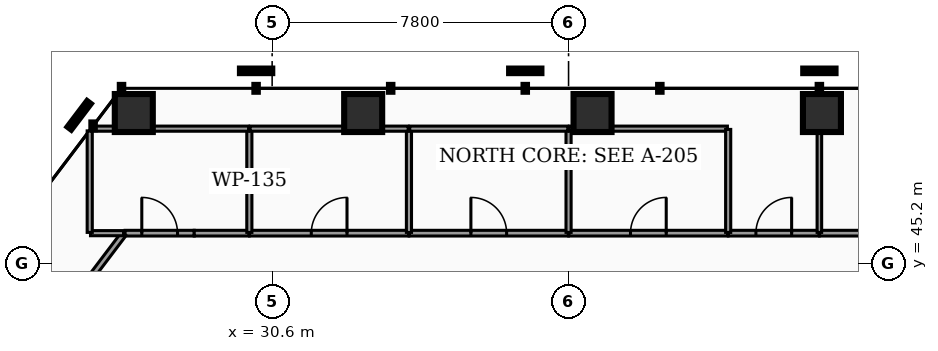
"""IFC4 building model, lengths in metres.
Left out: names, types, materials, properties, quantities, classifications, styles, units other than length and angle.
Written with IfcOpenShell. Run it as: python <this file> out.ifc"""

import sys

from ifc_helpers import new_model, si_unit, direction, frame, frame_2d, origin, origin_2d, place, context, subcontext, project, spatial, rectangle, hollow_rectangle, extrude, element, fill, save


model = new_model("IFC4")
c1 = context("Model", 3, precision=1e-05, world=origin(), true_north=direction((0.0, 1.0)))
c2 = subcontext(c1, "Body", "Model", "MODEL_VIEW")
j1 = project(units=[si_unit("LENGTHUNIT", "METRE"), si_unit("PLANEANGLEUNIT", "RADIAN")], contexts=[c1])
p1 = place(None, origin())
s1 = spatial("IfcSite", under=j1, at=p1, CompositionType="ELEMENT")
p2 = place(p1, origin())
s2 = spatial("IfcBuilding", under=s1, at=p2, CompositionType="ELEMENT")
p3 = place(p2, frame((0.0, 0.0, 68.34)))
s3 = spatial("IfcBuildingStorey", under=s2, at=p3, CompositionType="ELEMENT", Elevation=68.34)
p4 = place(p3, frame((45.067, 49.161, 0.0), z_axis=(0.043921338249, -0.020364690264, 0.998827410235), x_axis=(0.42064633694, 0.907224701614, 0.0)))
e1 = element("IfcColumn", 1, at=p4, inside=s3, PredefinedType="COLUMN", context=c2, shape_type="SweptSolid", body=[
    extrude(hollow_rectangle(XDim=1.0, YDim=1.0, WallThickness=0.05, at=origin_2d()), origin(), (0.0, 0.0, 1.0), 3.824),
])
p5 = place(p3, frame((39.031, 49.161, 0.0), z_axis=(-0.003706222059, -0.020384221326, 0.999785350682), x_axis=(0.9838699101, -0.1788854382, 0.0)))
e2 = element("IfcColumn", 2, at=p5, inside=s3, PredefinedType="COLUMN", context=c2, shape_type="SweptSolid", body=[
    extrude(hollow_rectangle(XDim=1.0, YDim=1.0, WallThickness=0.05, at=origin_2d()), origin(), (0.0, 0.0, 1.0), 3.821),
])
p6 = place(p3, frame((32.995, 49.161, 0.0), z_axis=(-0.051244939284, -0.02035757862, 0.998478605274), x_axis=(0.36919466432, -0.929352086046, 0.0)))
e3 = element("IfcColumn", 3, at=p6, inside=s3, PredefinedType="COLUMN", context=c2, shape_type="SweptSolid", body=[
    extrude(hollow_rectangle(XDim=1.0, YDim=1.0, WallThickness=0.05, at=origin_2d()), origin(), (0.0, 0.0, 1.0), 3.826),
])
p7 = place(p3, frame((26.96, 49.161, 0.0), z_axis=(-0.098563985299, -0.020285104071, 0.994923944508), x_axis=(0.201581600016, -0.979471724214, 0.0)))
e4 = element("IfcColumn", 4, at=p7, inside=s3, PredefinedType="COLUMN", context=c2, shape_type="SweptSolid", body=[
    extrude(hollow_rectangle(XDim=1.0, YDim=1.0, WallThickness=0.05, at=origin_2d()), origin(), (0.0, 0.0, 1.0), 3.839),
])
p8 = place(p3, frame((26.73, 46.0, 0.0), z_axis=(0.0, 0.0, 1.0), x_axis=(1.0, 0.0, 0.0)))
e5 = element("IfcWall", 5, at=p8, inside=s3, PredefinedType="PARTITIONING", context=c2, shape_type="SweptSolid", body=[
    extrude(rectangle(XDim=1.82, YDim=0.15, at=frame_2d((0.91, 0.0))), origin(), (0.0, 0.0, 1.0), 2.777),
])
p9 = place(p8, frame((0.44, 0.0, 0.0)))
e6 = element("IfcOpeningElement", 6, at=p9, cuts=e5, PredefinedType="OPENING", context=c2, shape_type="SweptSolid", body=[
    extrude(rectangle(XDim=0.94, YDim=2.05, at=frame_2d((0.47, 1.025))), frame((0.0, 0.085, 0.0), z_axis=(0.0, -1.0, 0.0), x_axis=(1.0, 0.0, 0.0)), (0.0, 0.0, 1.0), 0.17),
])
p10 = place(p3, frame((28.55, 46.0, 0.0), z_axis=(0.0, 0.0, 1.0), x_axis=(1.0, 0.0, 0.0)))
e7 = element("IfcWall", 7, at=p10, inside=s3, PredefinedType="PARTITIONING", context=c2, shape_type="SweptSolid", body=[
    extrude(rectangle(XDim=1.445, YDim=0.15, at=frame_2d((0.723, 0.0))), origin(), (0.0, 0.0, 1.0), 2.777),
])
p11 = place(p3, frame((30.005, 46.0, 0.0), z_axis=(0.0, 0.0, 1.0), x_axis=(1.0, 0.0, 0.0)))
e8 = element("IfcWall", 8, at=p11, inside=s3, PredefinedType="PARTITIONING", context=c2, shape_type="SweptSolid", body=[
    extrude(rectangle(XDim=4.19, YDim=0.15, at=frame_2d((2.095, 0.0))), origin(), (0.0, 0.0, 1.0), 2.777),
])
p12 = place(p11, frame((1.625, 0.0, 0.0)))
e9 = element("IfcOpeningElement", 9, at=p12, cuts=e8, PredefinedType="OPENING", context=c2, shape_type="SweptSolid", body=[
    extrude(rectangle(XDim=0.94, YDim=2.05, at=frame_2d((0.47, 1.025))), frame((0.0, 0.085, 0.0), z_axis=(0.0, -1.0, 0.0), x_axis=(1.0, 0.0, 0.0)), (0.0, 0.0, 1.0), 0.17),
])
p13 = place(p3, frame((34.205, 46.0, 0.0), z_axis=(0.0, 0.0, 1.0), x_axis=(1.0, 0.0, 0.0)))
e10 = element("IfcWall", 10, at=p13, inside=s3, PredefinedType="PARTITIONING", context=c2, shape_type="SweptSolid", body=[
    extrude(rectangle(XDim=4.19, YDim=0.15, at=frame_2d((2.095, 0.0))), origin(), (0.0, 0.0, 1.0), 2.777),
])
p14 = place(p13, frame((1.625, 0.0, 0.0)))
e11 = element("IfcOpeningElement", 11, at=p14, cuts=e10, PredefinedType="OPENING", context=c2, shape_type="SweptSolid", body=[
    extrude(rectangle(XDim=0.94, YDim=2.05, at=frame_2d((0.47, 1.025))), frame((0.0, 0.085, 0.0), z_axis=(0.0, -1.0, 0.0), x_axis=(1.0, 0.0, 0.0)), (0.0, 0.0, 1.0), 0.17),
])
p15 = place(p3, frame((38.405, 46.0, 0.0), z_axis=(0.0, 0.0, 1.0), x_axis=(1.0, 0.0, 0.0)))
e12 = element("IfcWall", 12, at=p15, inside=s3, PredefinedType="PARTITIONING", context=c2, shape_type="SweptSolid", body=[
    extrude(rectangle(XDim=4.19, YDim=0.15, at=frame_2d((2.095, 0.0))), origin(), (0.0, 0.0, 1.0), 2.777),
])
p16 = place(p15, frame((1.625, 0.0, 0.0)))
e13 = element("IfcOpeningElement", 13, at=p16, cuts=e12, PredefinedType="OPENING", context=c2, shape_type="SweptSolid", body=[
    extrude(rectangle(XDim=0.94, YDim=2.05, at=frame_2d((0.47, 1.025))), frame((0.0, 0.085, 0.0), z_axis=(0.0, -1.0, 0.0), x_axis=(1.0, 0.0, 0.0)), (0.0, 0.0, 1.0), 0.17),
])
p17 = place(p3, frame((25.45, 44.337, 0.0), z_axis=(0.0, 0.0, 1.0), x_axis=(0.603848590911, 0.797099039803, 0.0)))
e14 = element("IfcWall", 14, at=p17, inside=s3, PredefinedType="PARTITIONING", context=c2, shape_type="SweptSolid", body=[
    extrude(rectangle(XDim=2.067, YDim=0.15, at=frame_2d((1.033, 0.0))), origin(), (0.0, 0.0, 1.0), 2.777),
])
p18 = place(p3, frame((45.005, 46.0, 0.0), z_axis=(0.0, 0.0, 1.0), x_axis=(1.0, 0.0, 0.0)))
e15 = element("IfcWall", 15, at=p18, inside=s3, PredefinedType="PARTITIONING", context=c2, shape_type="SweptSolid", body=[
    extrude(rectangle(XDim=3.345, YDim=0.15, at=frame_2d((1.673, 0.0))), origin(), (0.0, 0.0, 1.0), 2.777),
])
p19 = place(p18, frame((1.202, 0.0, 0.0)))
e16 = element("IfcOpeningElement", 16, at=p19, cuts=e15, PredefinedType="OPENING", context=c2, shape_type="SweptSolid", body=[
    extrude(rectangle(XDim=0.94, YDim=2.05, at=frame_2d((0.47, 1.025))), frame((0.0, 0.085, 0.0), z_axis=(0.0, -1.0, 0.0), x_axis=(1.0, 0.0, 0.0)), (0.0, 0.0, 1.0), 0.17),
])
p20 = place(p3, frame((42.605, 46.0, 0.0), z_axis=(0.0, 0.0, 1.0), x_axis=(1.0, 0.0, 0.0)))
e17 = element("IfcWall", 17, at=p20, inside=s3, PredefinedType="PARTITIONING", context=c2, shape_type="SweptSolid", body=[
    extrude(rectangle(XDim=2.39, YDim=0.15, at=frame_2d((1.195, 0.0))), origin(), (0.0, 0.0, 1.0), 2.777),
])
p21 = place(p20, frame((0.725, 0.0, 0.0)))
e18 = element("IfcOpeningElement", 18, at=p21, cuts=e17, PredefinedType="OPENING", context=c2, shape_type="SweptSolid", body=[
    extrude(rectangle(XDim=0.94, YDim=2.05, at=frame_2d((0.47, 1.025))), frame((0.0, 0.085, 0.0), z_axis=(0.0, -1.0, 0.0), x_axis=(1.0, 0.0, 0.0)), (0.0, 0.0, 1.0), 0.17),
])
p22 = place(p3, frame((30.0, 46.02, 0.0), z_axis=(0.0, 0.0, 1.0), x_axis=(0.0, 1.0, 0.0)))
e19 = element("IfcWall", 19, at=p22, inside=s3, PredefinedType="PARTITIONING", context=c2, shape_type="SweptSolid", body=[
    extrude(rectangle(XDim=2.71, YDim=0.135, at=frame_2d((1.355, 0.0))), origin(), (0.0, 0.0, 1.0), 2.777),
])
p23 = place(p3, frame((25.82, 46.0, 0.0), z_axis=(0.0, 0.0, 1.0), x_axis=(1.0, 0.0, 0.0)))
e20 = element("IfcWall", 20, at=p23, inside=s3, PredefinedType="PARTITIONING", context=c2, shape_type="SweptSolid", body=[
    extrude(rectangle(XDim=0.87, YDim=0.135, at=frame_2d((0.435, 0.0))), origin(), (0.0, 0.0, 1.0), 2.777),
])
p24 = place(p3, frame((25.8, 46.02, 0.0), z_axis=(0.0, 0.0, 1.0), x_axis=(0.0, 1.0, 0.0)))
e21 = element("IfcWall", 21, at=p24, inside=s3, PredefinedType="PARTITIONING", context=c2, shape_type="SweptSolid", body=[
    extrude(rectangle(XDim=2.672, YDim=0.135, at=frame_2d((1.336, 0.0))), origin(), (0.0, 0.0, 1.0), 2.777),
])
p25 = place(p3, frame((25.848, 48.75, 0.0), z_axis=(0.0, 0.0, 1.0), x_axis=(1.0, 0.0, 0.0)))
e22 = element("IfcWall", 22, at=p25, inside=s3, PredefinedType="PARTITIONING", context=c2, shape_type="SweptSolid", body=[
    extrude(rectangle(XDim=4.132, YDim=0.135, at=frame_2d((2.066, 0.0))), origin(), (0.0, 0.0, 1.0), 2.777),
])
p26 = place(p3, frame((34.2, 46.02, 0.0), z_axis=(0.0, 0.0, 1.0), x_axis=(0.0, 1.0, 0.0)))
e23 = element("IfcWall", 23, at=p26, inside=s3, PredefinedType="PARTITIONING", context=c2, shape_type="SweptSolid", body=[
    extrude(rectangle(XDim=2.71, YDim=0.135, at=frame_2d((1.355, 0.0))), origin(), (0.0, 0.0, 1.0), 2.777),
])
p27 = place(p3, frame((30.02, 48.75, 0.0), z_axis=(0.0, 0.0, 1.0), x_axis=(1.0, 0.0, 0.0)))
e24 = element("IfcWall", 24, at=p27, inside=s3, PredefinedType="PARTITIONING", context=c2, shape_type="SweptSolid", body=[
    extrude(rectangle(XDim=4.16, YDim=0.135, at=frame_2d((2.08, 0.0))), origin(), (0.0, 0.0, 1.0), 2.777),
])
p28 = place(p3, frame((38.4, 46.02, 0.0), z_axis=(0.0, 0.0, 1.0), x_axis=(0.0, 1.0, 0.0)))
e25 = element("IfcWall", 25, at=p28, inside=s3, PredefinedType="PARTITIONING", context=c2, shape_type="SweptSolid", body=[
    extrude(rectangle(XDim=2.71, YDim=0.135, at=frame_2d((1.355, 0.0))), origin(), (0.0, 0.0, 1.0), 2.777),
])
p29 = place(p3, frame((34.22, 48.75, 0.0), z_axis=(0.0, 0.0, 1.0), x_axis=(1.0, 0.0, 0.0)))
e26 = element("IfcWall", 26, at=p29, inside=s3, PredefinedType="PARTITIONING", context=c2, shape_type="SweptSolid", body=[
    extrude(rectangle(XDim=4.16, YDim=0.135, at=frame_2d((2.08, 0.0))), origin(), (0.0, 0.0, 1.0), 2.777),
])
p30 = place(p3, frame((38.42, 48.75, 0.0), z_axis=(0.0, 0.0, 1.0), x_axis=(1.0, 0.0, 0.0)))
e27 = element("IfcWall", 27, at=p30, inside=s3, PredefinedType="PARTITIONING", context=c2, shape_type="SweptSolid", body=[
    extrude(rectangle(XDim=4.16, YDim=0.135, at=frame_2d((2.08, 0.0))), origin(), (0.0, 0.0, 1.0), 2.777),
])
p31 = place(p3, frame((42.6, 46.02, 0.0), z_axis=(0.0, 0.0, 1.0), x_axis=(0.0, 1.0, 0.0)))
e28 = element("IfcWall", 28, at=p31, inside=s3, PredefinedType="PARTITIONING", context=c2, shape_type="SweptSolid", body=[
    extrude(rectangle(XDim=2.71, YDim=0.135, at=frame_2d((1.355, 0.0))), origin(), (0.0, 0.0, 1.0), 2.777),
])
p32 = place(p3, frame((45.0, 46.02, 0.0), z_axis=(0.0, 0.0, 1.0), x_axis=(0.0, 1.0, 0.0)))
e29 = element("IfcWall", 29, at=p32, inside=s3, PredefinedType="PARTITIONING", context=c2, shape_type="SweptSolid", body=[
    extrude(rectangle(XDim=3.776, YDim=0.12, at=frame_2d((1.888, 0.0))), origin(), (0.0, 0.0, 1.0), 2.777),
])
p33 = place(p9, origin())
e30 = element("IfcDoor", 30, at=p33, inside=s3, OperationType="SINGLE_SWING_LEFT", PredefinedType="DOOR", context=c2, shape_type="SweptSolid", body=[
    extrude(rectangle(XDim=0.94, YDim=2.05, at=frame_2d((0.47, 1.025))), frame((0.0, 0.025, 0.0), z_axis=(0.0, -1.0, 0.0), x_axis=(1.0, 0.0, 0.0)), (0.0, 0.0, 1.0), 0.05),
])
fill(e6, e30)
p34 = place(p12, origin())
e31 = element("IfcDoor", 31, at=p34, inside=s3, OperationType="SINGLE_SWING_RIGHT", PredefinedType="DOOR", context=c2, shape_type="SweptSolid", body=[
    extrude(rectangle(XDim=0.94, YDim=2.05, at=frame_2d((0.47, 1.025))), frame((0.0, 0.025, 0.0), z_axis=(0.0, -1.0, 0.0), x_axis=(1.0, 0.0, 0.0)), (0.0, 0.0, 1.0), 0.05),
])
fill(e9, e31)
p35 = place(p14, origin())
e32 = element("IfcDoor", 32, at=p35, inside=s3, OperationType="SINGLE_SWING_LEFT", PredefinedType="DOOR", context=c2, shape_type="SweptSolid", body=[
    extrude(rectangle(XDim=0.94, YDim=2.05, at=frame_2d((0.47, 1.025))), frame((0.0, 0.025, 0.0), z_axis=(0.0, -1.0, 0.0), x_axis=(1.0, 0.0, 0.0)), (0.0, 0.0, 1.0), 0.05),
])
fill(e11, e32)
p36 = place(p16, origin())
e33 = element("IfcDoor", 33, at=p36, inside=s3, OperationType="SINGLE_SWING_RIGHT", PredefinedType="DOOR", context=c2, shape_type="SweptSolid", body=[
    extrude(rectangle(XDim=0.94, YDim=2.05, at=frame_2d((0.47, 1.025))), frame((0.0, 0.025, 0.0), z_axis=(0.0, -1.0, 0.0), x_axis=(1.0, 0.0, 0.0)), (0.0, 0.0, 1.0), 0.05),
])
fill(e13, e33)
p37 = place(p21, origin())
e34 = element("IfcDoor", 34, at=p37, inside=s3, OperationType="SINGLE_SWING_RIGHT", PredefinedType="DOOR", context=c2, shape_type="SweptSolid", body=[
    extrude(rectangle(XDim=0.94, YDim=2.05, at=frame_2d((0.47, 1.025))), frame((0.0, 0.025, 0.0), z_axis=(0.0, -1.0, 0.0), x_axis=(1.0, 0.0, 0.0)), (0.0, 0.0, 1.0), 0.05),
])
fill(e18, e34)
save(model, sys.argv[1])
